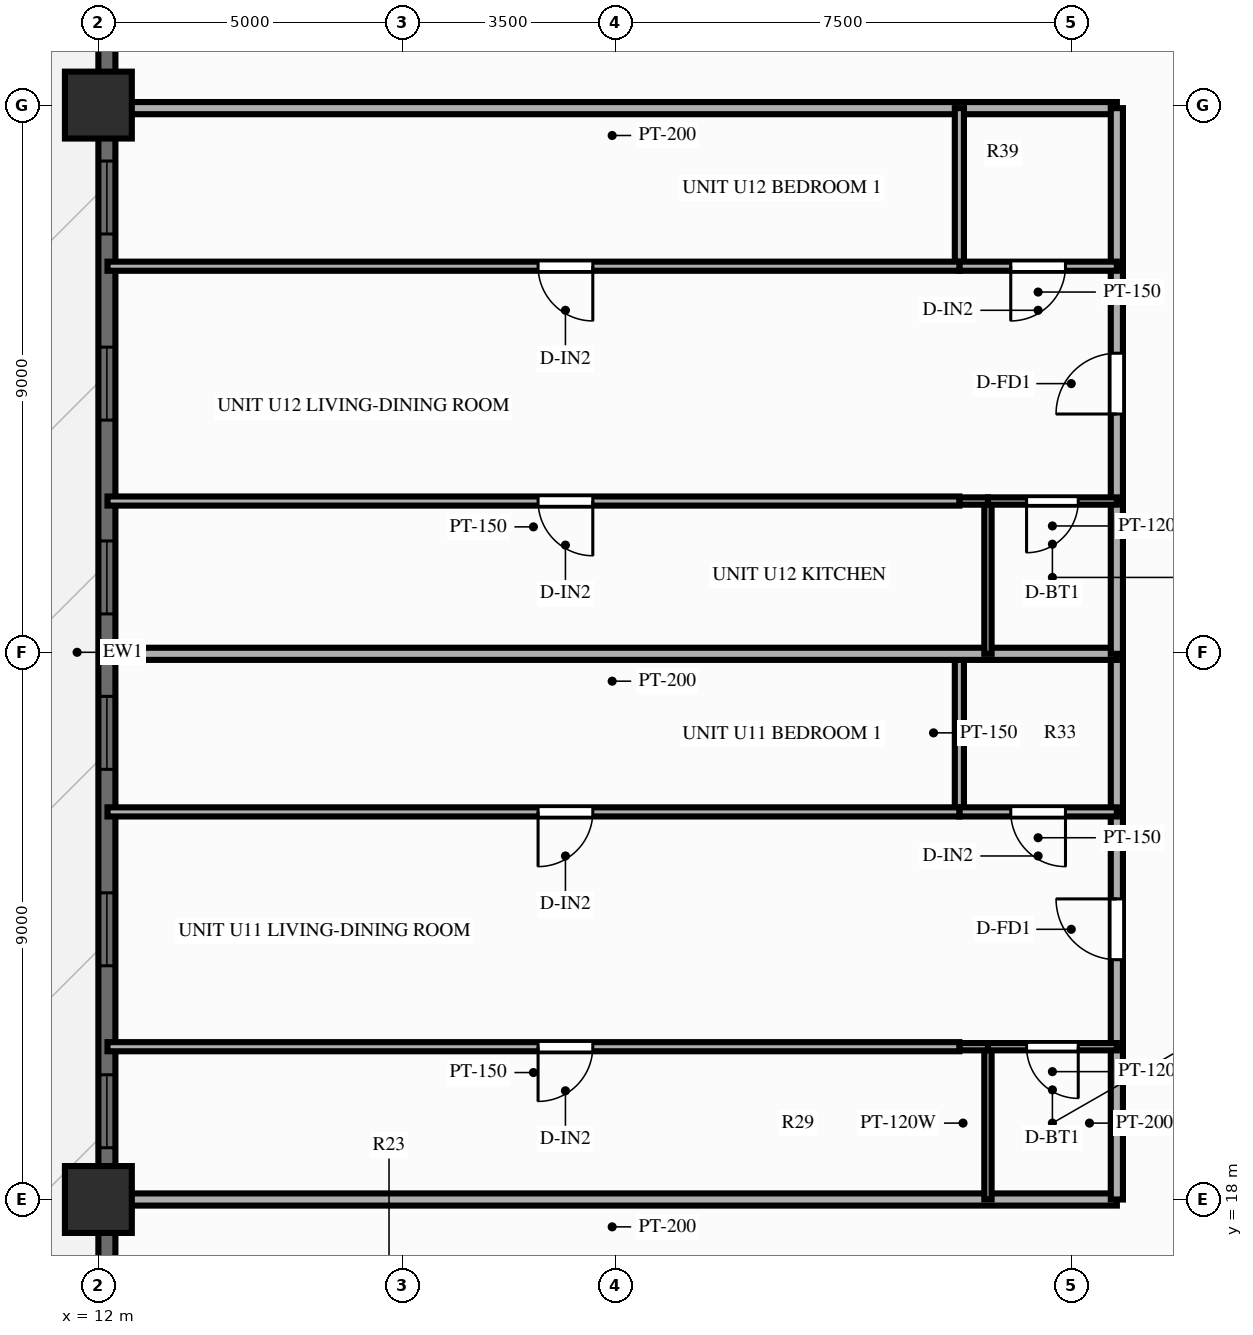
"""IFC4 building model, lengths in metres.
Left out: names, types, materials, properties, quantities, classifications, styles, units other than length and angle.
Written with IfcOpenShell. Run it as: python <this file> out.ifc"""

import sys

from ifc_helpers import new_model, si_unit, direction, frame, frame_2d, origin, origin_2d, place, context, subcontext, project, spatial, rectangle, extrude, source, transform, mapped, element, fill, save


model = new_model("IFC4")
c1 = context("Model", 3, precision=1e-05, world=origin(), true_north=direction((0.0, 1.0)))
c2 = subcontext(c1, "Body", "Model", "MODEL_VIEW")
j1 = project(units=[si_unit("LENGTHUNIT", "METRE"), si_unit("PLANEANGLEUNIT", "RADIAN")], contexts=[c1])
p1 = place(None, origin())
s1 = spatial("IfcSite", under=j1, at=p1, CompositionType="ELEMENT")
p2 = place(p1, origin())
s2 = spatial("IfcBuilding", under=s1, at=p2, CompositionType="ELEMENT")
p3 = place(p2, frame((0.0, 0.0, 25.4)))
s3 = spatial("IfcBuildingStorey", under=s2, at=p3, CompositionType="ELEMENT", Elevation=25.4)
m1 = source(origin(), c2, "Body", "SweptSolid", [
    extrude(rectangle(XDim=1.1, YDim=1.1, at=origin_2d()), origin(), (0.0, 0.0, 1.0), 3.0),
])
for number, where, z_axis, x_axis in (
    (1, (12.0, 36.0, 0.0), (0.0, 0.0, 1.0), (1.0, 0.0, 0.0)),
    (2, (12.0, 18.0, 0.0), (0.0, 0.0, 1.0), (1.0, 0.0, 0.0)),
):
    element("IfcColumn", number, at=place(p3, frame(where, z_axis=z_axis, x_axis=x_axis)), inside=s3, PredefinedType="COLUMN", context=c2, shape_type="MappedRepresentation", body=[
        mapped(m1, transform((0.0, 0.0, 0.0), scale=1.0)),
    ])
p4 = place(p3, frame((12.14, 6.5, 0.0), z_axis=(0.0, 0.0, 1.0), x_axis=(0.0, 1.0, 0.0)))
e3 = element("IfcWall", 3, at=p4, inside=s3, PredefinedType="SOLIDWALL", context=c2, shape_type="SweptSolid", body=[
    extrude(rectangle(XDim=41.0, YDim=0.28, at=frame_2d((20.5, 0.0))), origin(), (0.0, 0.0, 1.0), 2.28),
])
p5 = place(p4, frame((5.15, 0.0, 0.25)))
e4 = element("IfcOpeningElement", 4, at=p5, cuts=e3, PredefinedType="OPENING", context=c2, shape_type="SweptSolid", body=[
    extrude(rectangle(XDim=1.2, YDim=1.5, at=frame_2d((0.6, 0.75))), frame((0.0, 0.152, 0.0), z_axis=(0.0, -1.0, 0.0), x_axis=(1.0, 0.0, 0.0)), (0.0, 0.0, 1.0), 0.304),
])
p6 = place(p4, frame((12.352, 0.0, 0.25)))
e5 = element("IfcOpeningElement", 5, at=p6, cuts=e3, PredefinedType="OPENING", context=c2, shape_type="SweptSolid", body=[
    extrude(rectangle(XDim=1.2, YDim=1.5, at=frame_2d((0.6, 0.75))), frame((0.0, 0.152, 0.0), z_axis=(0.0, -1.0, 0.0), x_axis=(1.0, 0.0, 0.0)), (0.0, 0.0, 1.0), 0.304),
])
p7 = place(p4, frame((15.344, 0.0, 0.25)))
e6 = element("IfcOpeningElement", 6, at=p7, cuts=e3, PredefinedType="OPENING", context=c2, shape_type="SweptSolid", body=[
    extrude(rectangle(XDim=1.2, YDim=1.5, at=frame_2d((0.6, 0.75))), frame((0.0, 0.152, 0.0), z_axis=(0.0, -1.0, 0.0), x_axis=(1.0, 0.0, 0.0)), (0.0, 0.0, 1.0), 0.304),
])
p8 = place(p4, frame((18.575, 0.0, 0.25)))
e7 = element("IfcOpeningElement", 7, at=p8, cuts=e3, PredefinedType="OPENING", context=c2, shape_type="SweptSolid", body=[
    extrude(rectangle(XDim=1.2, YDim=1.5, at=frame_2d((0.6, 0.75))), frame((0.0, 0.152, 0.0), z_axis=(0.0, -1.0, 0.0), x_axis=(1.0, 0.0, 0.0)), (0.0, 0.0, 1.0), 0.304),
])
p9 = place(p4, frame((21.132, 0.0, 0.25)))
e8 = element("IfcOpeningElement", 8, at=p9, cuts=e3, PredefinedType="OPENING", context=c2, shape_type="SweptSolid", body=[
    extrude(rectangle(XDim=1.2, YDim=1.5, at=frame_2d((0.6, 0.75))), frame((0.0, 0.152, 0.0), z_axis=(0.0, -1.0, 0.0), x_axis=(1.0, 0.0, 0.0)), (0.0, 0.0, 1.0), 0.304),
])
p10 = place(p4, frame((24.319, 0.0, 0.25)))
e9 = element("IfcOpeningElement", 9, at=p10, cuts=e3, PredefinedType="OPENING", context=c2, shape_type="SweptSolid", body=[
    extrude(rectangle(XDim=1.2, YDim=1.5, at=frame_2d((0.6, 0.75))), frame((0.0, 0.152, 0.0), z_axis=(0.0, -1.0, 0.0), x_axis=(1.0, 0.0, 0.0)), (0.0, 0.0, 1.0), 0.304),
])
p11 = place(p4, frame((27.38, 0.0, 0.25)))
e10 = element("IfcOpeningElement", 10, at=p11, cuts=e3, PredefinedType="OPENING", context=c2, shape_type="SweptSolid", body=[
    extrude(rectangle(XDim=1.2, YDim=1.5, at=frame_2d((0.6, 0.75))), frame((0.0, 0.152, 0.0), z_axis=(0.0, -1.0, 0.0), x_axis=(1.0, 0.0, 0.0)), (0.0, 0.0, 1.0), 0.304),
])
p12 = place(p4, frame((34.45, 0.0, 0.0)))
e11 = element("IfcOpeningElement", 11, at=p12, cuts=e3, PredefinedType="OPENING", context=c2, shape_type="SweptSolid", body=[
    extrude(rectangle(XDim=1.6, YDim=2.15, at=frame_2d((0.8, 1.075))), frame((0.0, 0.152, 0.0), z_axis=(0.0, -1.0, 0.0), x_axis=(1.0, 0.0, 0.0)), (0.0, 0.0, 1.0), 0.304),
])
for number, where, z_axis, x_axis in (
    (12, (28.75, 18.0, 0.0), (0.0, 0.0, 1.0), (-1.0, 0.0, 0.0)),
    (13, (28.75, 35.95, 0.0), (0.0, 0.0, 1.0), (-1.0, 0.0, 0.0)),
):
    element("IfcWall", number, at=place(p3, frame(where, z_axis=z_axis, x_axis=x_axis)), inside=s3, PredefinedType="PARTITIONING", context=c2, shape_type="SweptSolid", body=[
        extrude(rectangle(XDim=16.6, YDim=0.2, at=frame_2d((8.3, 0.0))), origin(), (0.0, 0.0, 1.0), 2.24),
    ])
p13 = place(p3, frame((28.75, 18.0, 0.0), z_axis=(0.0, 0.0, 1.0), x_axis=(0.0, 1.0, 0.0)))
e14 = element("IfcWall", 14, at=p13, inside=s3, PredefinedType="PARTITIONING", context=c2, shape_type="SweptSolid", body=[
    extrude(rectangle(XDim=2.513, YDim=0.2, at=frame_2d((1.256, 0.0))), origin(), (0.0, 0.0, 1.0), 2.79),
])
p14 = place(p3, frame((28.75, 20.513, 0.0), z_axis=(0.0, 0.0, 1.0), x_axis=(0.0, 1.0, 0.0)))
e15 = element("IfcWall", 15, at=p14, inside=s3, PredefinedType="PARTITIONING", context=c2, shape_type="SweptSolid", body=[
    extrude(rectangle(XDim=3.862, YDim=0.2, at=frame_2d((1.931, 0.0))), origin(), (0.0, 0.0, 1.0), 2.79),
])
p15 = place(p14, frame((1.431, 0.0, 0.0)))
e16 = element("IfcOpeningElement", 16, at=p15, cuts=e15, PredefinedType="OPENING", context=c2, shape_type="SweptSolid", body=[
    extrude(rectangle(XDim=1.0, YDim=2.15, at=frame_2d((0.5, 1.075))), frame((0.0, 0.112, 0.0), z_axis=(0.0, -1.0, 0.0), x_axis=(1.0, 0.0, 0.0)), (0.0, 0.0, 1.0), 0.224),
])
p16 = place(p3, frame((28.75, 24.375, 0.0), z_axis=(0.0, 0.0, 1.0), x_axis=(0.0, 1.0, 0.0)))
e17 = element("IfcWall", 17, at=p16, inside=s3, PredefinedType="PARTITIONING", context=c2, shape_type="SweptSolid", body=[
    extrude(rectangle(XDim=2.6, YDim=0.2, at=frame_2d((1.3, 0.0))), origin(), (0.0, 0.0, 1.0), 2.79),
])
p17 = place(p3, frame((26.63, 18.0, 0.0), z_axis=(0.0, 0.0, 1.0), x_axis=(0.0, 1.0, 0.0)))
e18 = element("IfcWall", 18, at=p17, inside=s3, PredefinedType="PARTITIONING", context=c2, shape_type="SweptSolid", body=[
    extrude(rectangle(XDim=2.513, YDim=0.12, at=frame_2d((1.256, 0.0))), origin(), (0.0, 0.0, 1.0), 2.79),
])
p18 = place(p3, frame((26.16, 24.375, 0.0), z_axis=(0.0, 0.0, 1.0), x_axis=(0.0, 1.0, 0.0)))
e19 = element("IfcWall", 19, at=p18, inside=s3, PredefinedType="PARTITIONING", context=c2, shape_type="SweptSolid", body=[
    extrude(rectangle(XDim=2.6, YDim=0.15, at=frame_2d((1.3, 0.0))), origin(), (0.0, 0.0, 1.0), 2.79),
])
p19 = place(p3, frame((28.75, 20.513, 0.0), z_axis=(0.0, 0.0, 1.0), x_axis=(-1.0, 0.0, 0.0)))
e20 = element("IfcWall", 20, at=p19, inside=s3, PredefinedType="PARTITIONING", context=c2, shape_type="SweptSolid", body=[
    extrude(rectangle(XDim=2.12, YDim=0.12, at=frame_2d((1.06, 0.0))), origin(), (0.0, 0.0, 1.0), 2.79),
])
p20 = place(p19, frame((0.635, 0.0, 0.0)))
e21 = element("IfcOpeningElement", 21, at=p20, cuts=e20, PredefinedType="OPENING", context=c2, shape_type="SweptSolid", body=[
    extrude(rectangle(XDim=0.85, YDim=2.05, at=frame_2d((0.425, 1.025))), frame((0.0, 0.072, 0.0), z_axis=(0.0, -1.0, 0.0), x_axis=(1.0, 0.0, 0.0)), (0.0, 0.0, 1.0), 0.144),
])
p21 = place(p3, frame((26.63, 20.513, 0.0), z_axis=(0.0, 0.0, 1.0), x_axis=(-1.0, 0.0, 0.0)))
e22 = element("IfcWall", 22, at=p21, inside=s3, PredefinedType="PARTITIONING", context=c2, shape_type="SweptSolid", body=[
    extrude(rectangle(XDim=0.47, YDim=0.12, at=frame_2d((0.235, 0.0))), origin(), (0.0, 0.0, 1.0), 2.79),
])
p22 = place(p3, frame((26.16, 20.513, 0.0), z_axis=(0.0, 0.0, 1.0), x_axis=(-1.0, 0.0, 0.0)))
e23 = element("IfcWall", 23, at=p22, inside=s3, PredefinedType="PARTITIONING", context=c2, shape_type="SweptSolid", body=[
    extrude(rectangle(XDim=14.01, YDim=0.15, at=frame_2d((7.005, 0.0))), origin(), (0.0, 0.0, 1.0), 2.79),
])
p23 = place(p22, frame((6.029, 0.0, 0.0)))
e24 = element("IfcOpeningElement", 24, at=p23, cuts=e23, PredefinedType="OPENING", context=c2, shape_type="SweptSolid", body=[
    extrude(rectangle(XDim=0.9, YDim=2.1, at=frame_2d((0.45, 1.05))), frame((0.0, 0.087, 0.0), z_axis=(0.0, -1.0, 0.0), x_axis=(1.0, 0.0, 0.0)), (0.0, 0.0, 1.0), 0.174),
])
p24 = place(p3, frame((28.75, 24.375, 0.0), z_axis=(0.0, 0.0, 1.0), x_axis=(-1.0, 0.0, 0.0)))
e25 = element("IfcWall", 25, at=p24, inside=s3, PredefinedType="PARTITIONING", context=c2, shape_type="SweptSolid", body=[
    extrude(rectangle(XDim=2.59, YDim=0.15, at=frame_2d((1.295, 0.0))), origin(), (0.0, 0.0, 1.0), 2.79),
])
p25 = place(p24, frame((0.845, 0.0, 0.0)))
e26 = element("IfcOpeningElement", 26, at=p25, cuts=e25, PredefinedType="OPENING", context=c2, shape_type="SweptSolid", body=[
    extrude(rectangle(XDim=0.9, YDim=2.1, at=frame_2d((0.45, 1.05))), frame((0.0, 0.087, 0.0), z_axis=(0.0, -1.0, 0.0), x_axis=(1.0, 0.0, 0.0)), (0.0, 0.0, 1.0), 0.174),
])
p26 = place(p3, frame((26.16, 24.375, 0.0), z_axis=(0.0, 0.0, 1.0), x_axis=(-1.0, 0.0, 0.0)))
e27 = element("IfcWall", 27, at=p26, inside=s3, PredefinedType="PARTITIONING", context=c2, shape_type="SweptSolid", body=[
    extrude(rectangle(XDim=14.01, YDim=0.15, at=frame_2d((7.005, 0.0))), origin(), (0.0, 0.0, 1.0), 2.79),
])
p27 = place(p26, frame((6.029, 0.0, 0.0)))
e28 = element("IfcOpeningElement", 28, at=p27, cuts=e27, PredefinedType="OPENING", context=c2, shape_type="SweptSolid", body=[
    extrude(rectangle(XDim=0.9, YDim=2.1, at=frame_2d((0.45, 1.05))), frame((0.0, 0.087, 0.0), z_axis=(0.0, -1.0, 0.0), x_axis=(1.0, 0.0, 0.0)), (0.0, 0.0, 1.0), 0.174),
])
p28 = place(p3, frame((28.75, 26.975, 0.0), z_axis=(0.0, 0.0, 1.0), x_axis=(-1.0, 0.0, 0.0)))
e29 = element("IfcWall", 29, at=p28, inside=s3, PredefinedType="PARTITIONING", context=c2, shape_type="SweptSolid", body=[
    extrude(rectangle(XDim=16.6, YDim=0.2, at=frame_2d((8.3, 0.0))), origin(), (0.0, 0.0, 1.0), 2.79),
])
p29 = place(p3, frame((28.75, 26.975, 0.0), z_axis=(0.0, 0.0, 1.0), x_axis=(0.0, 1.0, 0.0)))
e30 = element("IfcWall", 30, at=p29, inside=s3, PredefinedType="PARTITIONING", context=c2, shape_type="SweptSolid", body=[
    extrude(rectangle(XDim=2.513, YDim=0.2, at=frame_2d((1.256, 0.0))), origin(), (0.0, 0.0, 1.0), 2.79),
])
p30 = place(p3, frame((28.75, 29.488, 0.0), z_axis=(0.0, 0.0, 1.0), x_axis=(0.0, 1.0, 0.0)))
e31 = element("IfcWall", 31, at=p30, inside=s3, PredefinedType="PARTITIONING", context=c2, shape_type="SweptSolid", body=[
    extrude(rectangle(XDim=3.862, YDim=0.2, at=frame_2d((1.931, 0.0))), origin(), (0.0, 0.0, 1.0), 2.79),
])
p31 = place(p30, frame((1.431, 0.0, 0.0)))
e32 = element("IfcOpeningElement", 32, at=p31, cuts=e31, PredefinedType="OPENING", context=c2, shape_type="SweptSolid", body=[
    extrude(rectangle(XDim=1.0, YDim=2.15, at=frame_2d((0.5, 1.075))), frame((0.0, 0.112, 0.0), z_axis=(0.0, -1.0, 0.0), x_axis=(1.0, 0.0, 0.0)), (0.0, 0.0, 1.0), 0.224),
])
p32 = place(p3, frame((28.75, 33.35, 0.0), z_axis=(0.0, 0.0, 1.0), x_axis=(0.0, 1.0, 0.0)))
e33 = element("IfcWall", 33, at=p32, inside=s3, PredefinedType="PARTITIONING", context=c2, shape_type="SweptSolid", body=[
    extrude(rectangle(XDim=2.6, YDim=0.2, at=frame_2d((1.3, 0.0))), origin(), (0.0, 0.0, 1.0), 2.79),
])
p33 = place(p3, frame((26.63, 26.975, 0.0), z_axis=(0.0, 0.0, 1.0), x_axis=(0.0, 1.0, 0.0)))
e34 = element("IfcWall", 34, at=p33, inside=s3, PredefinedType="PARTITIONING", context=c2, shape_type="SweptSolid", body=[
    extrude(rectangle(XDim=2.513, YDim=0.12, at=frame_2d((1.256, 0.0))), origin(), (0.0, 0.0, 1.0), 2.79),
])
p34 = place(p3, frame((26.16, 33.35, 0.0), z_axis=(0.0, 0.0, 1.0), x_axis=(0.0, 1.0, 0.0)))
e35 = element("IfcWall", 35, at=p34, inside=s3, PredefinedType="PARTITIONING", context=c2, shape_type="SweptSolid", body=[
    extrude(rectangle(XDim=2.6, YDim=0.15, at=frame_2d((1.3, 0.0))), origin(), (0.0, 0.0, 1.0), 2.79),
])
p35 = place(p3, frame((28.75, 29.488, 0.0), z_axis=(0.0, 0.0, 1.0), x_axis=(-1.0, 0.0, 0.0)))
e36 = element("IfcWall", 36, at=p35, inside=s3, PredefinedType="PARTITIONING", context=c2, shape_type="SweptSolid", body=[
    extrude(rectangle(XDim=2.12, YDim=0.12, at=frame_2d((1.06, 0.0))), origin(), (0.0, 0.0, 1.0), 2.79),
])
p36 = place(p35, frame((0.635, 0.0, 0.0)))
e37 = element("IfcOpeningElement", 37, at=p36, cuts=e36, PredefinedType="OPENING", context=c2, shape_type="SweptSolid", body=[
    extrude(rectangle(XDim=0.85, YDim=2.05, at=frame_2d((0.425, 1.025))), frame((0.0, 0.072, 0.0), z_axis=(0.0, -1.0, 0.0), x_axis=(1.0, 0.0, 0.0)), (0.0, 0.0, 1.0), 0.144),
])
p37 = place(p3, frame((26.63, 29.488, 0.0), z_axis=(0.0, 0.0, 1.0), x_axis=(-1.0, 0.0, 0.0)))
e38 = element("IfcWall", 38, at=p37, inside=s3, PredefinedType="PARTITIONING", context=c2, shape_type="SweptSolid", body=[
    extrude(rectangle(XDim=0.47, YDim=0.12, at=frame_2d((0.235, 0.0))), origin(), (0.0, 0.0, 1.0), 2.79),
])
p38 = place(p3, frame((26.16, 29.488, 0.0), z_axis=(0.0, 0.0, 1.0), x_axis=(-1.0, 0.0, 0.0)))
e39 = element("IfcWall", 39, at=p38, inside=s3, PredefinedType="PARTITIONING", context=c2, shape_type="SweptSolid", body=[
    extrude(rectangle(XDim=14.01, YDim=0.15, at=frame_2d((7.005, 0.0))), origin(), (0.0, 0.0, 1.0), 2.79),
])
p39 = place(p38, frame((6.029, 0.0, 0.0)))
e40 = element("IfcOpeningElement", 40, at=p39, cuts=e39, PredefinedType="OPENING", context=c2, shape_type="SweptSolid", body=[
    extrude(rectangle(XDim=0.9, YDim=2.1, at=frame_2d((0.45, 1.05))), frame((0.0, 0.087, 0.0), z_axis=(0.0, -1.0, 0.0), x_axis=(1.0, 0.0, 0.0)), (0.0, 0.0, 1.0), 0.174),
])
p40 = place(p3, frame((28.75, 33.35, 0.0), z_axis=(0.0, 0.0, 1.0), x_axis=(-1.0, 0.0, 0.0)))
e41 = element("IfcWall", 41, at=p40, inside=s3, PredefinedType="PARTITIONING", context=c2, shape_type="SweptSolid", body=[
    extrude(rectangle(XDim=2.59, YDim=0.15, at=frame_2d((1.295, 0.0))), origin(), (0.0, 0.0, 1.0), 2.79),
])
p41 = place(p40, frame((0.845, 0.0, 0.0)))
e42 = element("IfcOpeningElement", 42, at=p41, cuts=e41, PredefinedType="OPENING", context=c2, shape_type="SweptSolid", body=[
    extrude(rectangle(XDim=0.9, YDim=2.1, at=frame_2d((0.45, 1.05))), frame((0.0, 0.087, 0.0), z_axis=(0.0, -1.0, 0.0), x_axis=(1.0, 0.0, 0.0)), (0.0, 0.0, 1.0), 0.174),
])
p42 = place(p3, frame((26.16, 33.35, 0.0), z_axis=(0.0, 0.0, 1.0), x_axis=(-1.0, 0.0, 0.0)))
e43 = element("IfcWall", 43, at=p42, inside=s3, PredefinedType="PARTITIONING", context=c2, shape_type="SweptSolid", body=[
    extrude(rectangle(XDim=14.01, YDim=0.15, at=frame_2d((7.005, 0.0))), origin(), (0.0, 0.0, 1.0), 2.79),
])
p43 = place(p42, frame((6.029, 0.0, 0.0)))
e44 = element("IfcOpeningElement", 44, at=p43, cuts=e43, PredefinedType="OPENING", context=c2, shape_type="SweptSolid", body=[
    extrude(rectangle(XDim=0.9, YDim=2.1, at=frame_2d((0.45, 1.05))), frame((0.0, 0.087, 0.0), z_axis=(0.0, -1.0, 0.0), x_axis=(1.0, 0.0, 0.0)), (0.0, 0.0, 1.0), 0.174),
])
m2 = source(origin(), c2, "Body", "SweptSolid", [
    extrude(rectangle(XDim=1.2, YDim=1.5, at=frame_2d((0.6, 0.75))), frame((0.0, 0.03, 0.0), z_axis=(0.0, -1.0, 0.0), x_axis=(1.0, 0.0, 0.0)), (0.0, 0.0, 1.0), 0.06),
])
p44 = place(p6, origin())
e45 = element("IfcWindow", 45, at=p44, inside=s3, PartitioningType="SINGLE_PANEL", PredefinedType="WINDOW", context=c2, shape_type="MappedRepresentation", body=[
    mapped(m2, transform((0.0, 0.0, 0.0), scale=1.0)),
])
fill(e5, e45)
p45 = place(p7, origin())
e46 = element("IfcWindow", 46, at=p45, inside=s3, PartitioningType="SINGLE_PANEL", PredefinedType="WINDOW", context=c2, shape_type="MappedRepresentation", body=[
    mapped(m2, transform((0.0, 0.0, 0.0), scale=1.0)),
])
fill(e6, e46)
p46 = place(p8, origin())
e47 = element("IfcWindow", 47, at=p46, inside=s3, PartitioningType="SINGLE_PANEL", PredefinedType="WINDOW", context=c2, shape_type="MappedRepresentation", body=[
    mapped(m2, transform((0.0, 0.0, 0.0), scale=1.0)),
])
fill(e7, e47)
p47 = place(p9, origin())
e48 = element("IfcWindow", 48, at=p47, inside=s3, PartitioningType="SINGLE_PANEL", PredefinedType="WINDOW", context=c2, shape_type="MappedRepresentation", body=[
    mapped(m2, transform((0.0, 0.0, 0.0), scale=1.0)),
])
fill(e8, e48)
p48 = place(p10, origin())
e49 = element("IfcWindow", 49, at=p48, inside=s3, PartitioningType="SINGLE_PANEL", PredefinedType="WINDOW", context=c2, shape_type="MappedRepresentation", body=[
    mapped(m2, transform((0.0, 0.0, 0.0), scale=1.0)),
])
fill(e9, e49)
p49 = place(p11, origin())
e50 = element("IfcWindow", 50, at=p49, inside=s3, PartitioningType="SINGLE_PANEL", PredefinedType="WINDOW", context=c2, shape_type="MappedRepresentation", body=[
    mapped(m2, transform((0.0, 0.0, 0.0), scale=1.0)),
])
fill(e10, e50)
m3 = source(origin(), c2, "Body", "SweptSolid", [
    extrude(rectangle(XDim=1.0, YDim=2.15, at=frame_2d((0.5, 1.075))), frame((0.0, 0.025, 0.0), z_axis=(0.0, -1.0, 0.0), x_axis=(1.0, 0.0, 0.0)), (0.0, 0.0, 1.0), 0.05),
])
p50 = place(p15, origin())
e51 = element("IfcDoor", 51, at=p50, inside=s3, OperationType="SINGLE_SWING_RIGHT", PredefinedType="DOOR", context=c2, shape_type="MappedRepresentation", body=[
    mapped(m3, transform((0.0, 0.0, 0.0), scale=1.0)),
])
fill(e16, e51)
m4 = source(origin(), c2, "Body", "SweptSolid", [
    extrude(rectangle(XDim=0.85, YDim=2.05, at=frame_2d((0.425, 1.025))), frame((0.0, 0.025, 0.0), z_axis=(0.0, -1.0, 0.0), x_axis=(1.0, 0.0, 0.0)), (0.0, 0.0, 1.0), 0.05),
])
p51 = place(p20, origin())
e52 = element("IfcDoor", 52, at=p51, inside=s3, OperationType="SINGLE_SWING_LEFT", PredefinedType="DOOR", context=c2, shape_type="MappedRepresentation", body=[
    mapped(m4, transform((0.0, 0.0, 0.0), scale=1.0)),
])
fill(e21, e52)
m5 = source(origin(), c2, "Body", "SweptSolid", [
    extrude(rectangle(XDim=0.9, YDim=2.1, at=frame_2d((0.45, 1.05))), frame((0.0, 0.025, 0.0), z_axis=(0.0, -1.0, 0.0), x_axis=(1.0, 0.0, 0.0)), (0.0, 0.0, 1.0), 0.05),
])
p52 = place(p23, origin())
e53 = element("IfcDoor", 53, at=p52, inside=s3, OperationType="SINGLE_SWING_RIGHT", PredefinedType="DOOR", context=c2, shape_type="MappedRepresentation", body=[
    mapped(m5, transform((0.0, 0.0, 0.0), scale=1.0)),
])
fill(e24, e53)
p53 = place(p25, origin())
e54 = element("IfcDoor", 54, at=p53, inside=s3, OperationType="SINGLE_SWING_LEFT", PredefinedType="DOOR", context=c2, shape_type="MappedRepresentation", body=[
    mapped(m5, transform((0.0, 0.0, 0.0), scale=1.0)),
])
fill(e26, e54)
p54 = place(p27, origin())
e55 = element("IfcDoor", 55, at=p54, inside=s3, OperationType="SINGLE_SWING_RIGHT", PredefinedType="DOOR", context=c2, shape_type="MappedRepresentation", body=[
    mapped(m5, transform((0.0, 0.0, 0.0), scale=1.0)),
])
fill(e28, e55)
p55 = place(p31, origin())
e56 = element("IfcDoor", 56, at=p55, inside=s3, OperationType="SINGLE_SWING_LEFT", PredefinedType="DOOR", context=c2, shape_type="MappedRepresentation", body=[
    mapped(m3, transform((0.0, 0.0, 0.0), scale=1.0)),
])
fill(e32, e56)
p56 = place(p36, origin())
e57 = element("IfcDoor", 57, at=p56, inside=s3, OperationType="SINGLE_SWING_RIGHT", PredefinedType="DOOR", context=c2, shape_type="MappedRepresentation", body=[
    mapped(m4, transform((0.0, 0.0, 0.0), scale=1.0)),
])
fill(e37, e57)
p57 = place(p39, origin())
e58 = element("IfcDoor", 58, at=p57, inside=s3, OperationType="SINGLE_SWING_LEFT", PredefinedType="DOOR", context=c2, shape_type="MappedRepresentation", body=[
    mapped(m5, transform((0.0, 0.0, 0.0), scale=1.0)),
])
fill(e40, e58)
p58 = place(p41, origin())
e59 = element("IfcDoor", 59, at=p58, inside=s3, OperationType="SINGLE_SWING_RIGHT", PredefinedType="DOOR", context=c2, shape_type="MappedRepresentation", body=[
    mapped(m5, transform((0.0, 0.0, 0.0), scale=1.0)),
])
fill(e42, e59)
p59 = place(p43, origin())
e60 = element("IfcDoor", 60, at=p59, inside=s3, OperationType="SINGLE_SWING_LEFT", PredefinedType="DOOR", context=c2, shape_type="MappedRepresentation", body=[
    mapped(m5, transform((0.0, 0.0, 0.0), scale=1.0)),
])
fill(e44, e60)
save(model, sys.argv[1])
